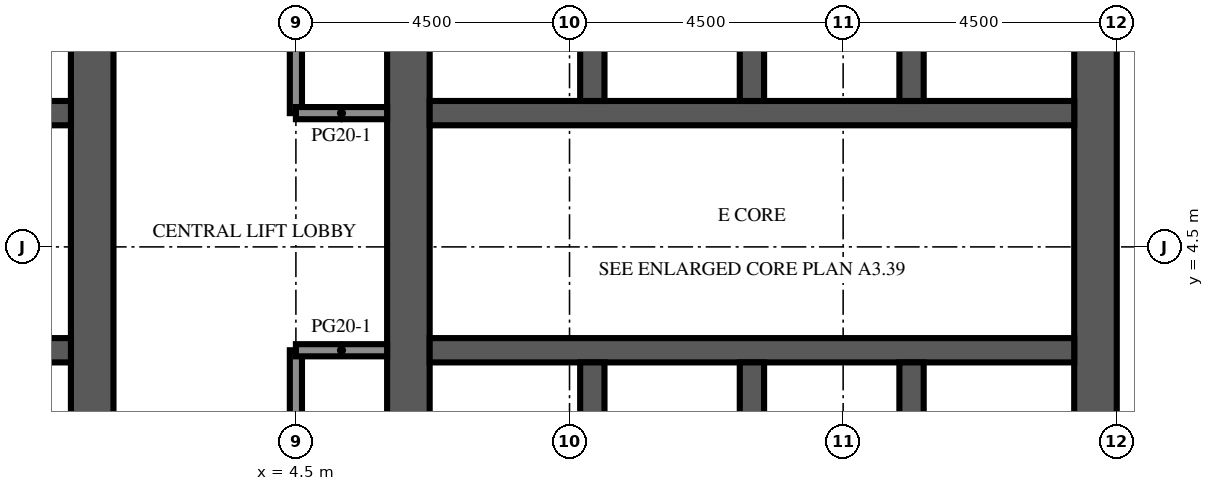
"""IFC4 building model, lengths in metres.
Left out: names, types, materials, properties, quantities, classifications, styles, units other than length and angle.
Written with IfcOpenShell. Run it as: python <this file> out.ifc"""

import sys

from ifc_helpers import new_model, si_unit, direction, frame, frame_2d, origin, place, context, subcontext, project, spatial, rectangle, extrude, element, fill, save


model = new_model("IFC4")
c1 = context("Model", 3, precision=1e-05, world=origin(), true_north=direction((0.0, 1.0)))
c2 = subcontext(c1, "Body", "Model", "MODEL_VIEW")
j1 = project(units=[si_unit("LENGTHUNIT", "METRE"), si_unit("PLANEANGLEUNIT", "RADIAN")], contexts=[c1])
p1 = place(None, origin())
s1 = spatial("IfcSite", under=j1, at=p1, CompositionType="ELEMENT")
p2 = place(p1, origin())
s2 = spatial("IfcBuilding", under=s1, at=p2, CompositionType="ELEMENT")
p3 = place(p2, frame((0.0, 0.0, 266.3)))
s3 = spatial("IfcBuildingStorey", under=s2, at=p3, CompositionType="ELEMENT", Elevation=266.3)
p4 = place(p3, frame((1.15, -9.0, 0.0), z_axis=(0.0, 0.0, 1.0), x_axis=(0.0, 1.0, 0.0)))
e1 = element("IfcWall", 1, at=p4, inside=s3, PredefinedType="SHEAR", context=c2, shape_type="SweptSolid", body=[
    extrude(rectangle(XDim=27.5, YDim=0.7, at=frame_2d((13.75, 0.0))), origin(), (0.0, 0.0, 1.0), 4.1),
])
p5 = place(p4, frame((12.55, 0.0, 0.0)))
e2 = element("IfcOpeningElement", 2, at=p5, cuts=e1, PredefinedType="OPENING", context=c2, shape_type="SweptSolid", body=[
    extrude(rectangle(XDim=2.4, YDim=2.4, at=frame_2d((1.2, 1.2))), frame((0.0, 0.36, 0.0), z_axis=(0.0, -1.0, 0.0), x_axis=(1.0, 0.0, 0.0)), (0.0, 0.0, 1.0), 0.72),
])
p6 = place(p4, frame((3.788, 0.0, 0.0)))
e3 = element("IfcOpeningElement", 3, at=p6, cuts=e1, PredefinedType="OPENING", context=c2, shape_type="SweptSolid", body=[
    extrude(rectangle(XDim=0.968, YDim=2.1, at=frame_2d((0.484, 1.05))), frame((0.0, 0.36, 0.0), z_axis=(0.0, -1.0, 0.0), x_axis=(1.0, 0.0, 0.0)), (0.0, 0.0, 1.0), 0.72),
])
p7 = place(p4, frame((23.54, 0.0, 0.0)))
e4 = element("IfcOpeningElement", 4, at=p7, cuts=e1, PredefinedType="OPENING", context=c2, shape_type="SweptSolid", body=[
    extrude(rectangle(XDim=1.2, YDim=2.1, at=frame_2d((0.6, 1.05))), frame((0.0, 0.36, 0.0), z_axis=(0.0, -1.0, 0.0), x_axis=(1.0, 0.0, 0.0)), (0.0, 0.0, 1.0), 0.72),
])
p8 = place(p3, frame((-9.8, 2.8, 0.0), z_axis=(0.0, 0.0, 1.0), x_axis=(1.0, 0.0, 0.0)))
e5 = element("IfcWall", 5, at=p8, inside=s3, PredefinedType="SHEAR", context=c2, shape_type="SweptSolid", body=[
    extrude(rectangle(XDim=10.6, YDim=0.4, at=frame_2d((5.3, 0.0))), origin(), (0.0, 0.0, 1.0), 4.1),
])
p9 = place(p8, frame((0.688, 0.0, 0.0)))
e6 = element("IfcOpeningElement", 6, at=p9, cuts=e5, PredefinedType="OPENING", context=c2, shape_type="SweptSolid", body=[
    extrude(rectangle(XDim=1.1, YDim=2.1, at=frame_2d((0.55, 1.05))), frame((0.0, 0.21, 0.0), z_axis=(0.0, -1.0, 0.0), x_axis=(1.0, 0.0, 0.0)), (0.0, 0.0, 1.0), 0.42),
])
p10 = place(p8, frame((3.438, 0.0, 0.0)))
e7 = element("IfcOpeningElement", 7, at=p10, cuts=e5, PredefinedType="OPENING", context=c2, shape_type="SweptSolid", body=[
    extrude(rectangle(XDim=1.1, YDim=2.1, at=frame_2d((0.55, 1.05))), frame((0.0, 0.21, 0.0), z_axis=(0.0, -1.0, 0.0), x_axis=(1.0, 0.0, 0.0)), (0.0, 0.0, 1.0), 0.42),
])
p11 = place(p8, frame((6.113, 0.0, 0.0)))
e8 = element("IfcOpeningElement", 8, at=p11, cuts=e5, PredefinedType="OPENING", context=c2, shape_type="SweptSolid", body=[
    extrude(rectangle(XDim=1.0, YDim=2.1, at=frame_2d((0.5, 1.05))), frame((0.0, 0.21, 0.0), z_axis=(0.0, -1.0, 0.0), x_axis=(1.0, 0.0, 0.0)), (0.0, 0.0, 1.0), 0.42),
])
p12 = place(p8, frame((8.863, 0.0, 0.0)))
e9 = element("IfcOpeningElement", 9, at=p12, cuts=e5, PredefinedType="OPENING", context=c2, shape_type="SweptSolid", body=[
    extrude(rectangle(XDim=1.0, YDim=2.1, at=frame_2d((0.5, 1.05))), frame((0.0, 0.21, 0.0), z_axis=(0.0, -1.0, 0.0), x_axis=(1.0, 0.0, 0.0)), (0.0, 0.0, 1.0), 0.42),
])
p13 = place(p3, frame((-9.8, 6.7, 0.0), z_axis=(0.0, 0.0, 1.0), x_axis=(1.0, 0.0, 0.0)))
e10 = element("IfcWall", 10, at=p13, inside=s3, PredefinedType="SHEAR", context=c2, shape_type="SweptSolid", body=[
    extrude(rectangle(XDim=10.6, YDim=0.4, at=frame_2d((5.3, 0.0))), origin(), (0.0, 0.0, 1.0), 4.1),
])
p14 = place(p13, frame((3.438, 0.0, 0.0)))
e11 = element("IfcOpeningElement", 11, at=p14, cuts=e10, PredefinedType="OPENING", context=c2, shape_type="SweptSolid", body=[
    extrude(rectangle(XDim=1.1, YDim=2.1, at=frame_2d((0.55, 1.05))), frame((0.0, 0.21, 0.0), z_axis=(0.0, -1.0, 0.0), x_axis=(1.0, 0.0, 0.0)), (0.0, 0.0, 1.0), 0.42),
])
p15 = place(p13, frame((6.062, 0.0, 0.0)))
e12 = element("IfcOpeningElement", 12, at=p15, cuts=e10, PredefinedType="OPENING", context=c2, shape_type="SweptSolid", body=[
    extrude(rectangle(XDim=1.1, YDim=2.1, at=frame_2d((0.55, 1.05))), frame((0.0, 0.21, 0.0), z_axis=(0.0, -1.0, 0.0), x_axis=(1.0, 0.0, 0.0)), (0.0, 0.0, 1.0), 0.42),
])
p16 = place(p13, frame((8.812, 0.0, 0.0)))
e13 = element("IfcOpeningElement", 13, at=p16, cuts=e10, PredefinedType="OPENING", context=c2, shape_type="SweptSolid", body=[
    extrude(rectangle(XDim=1.1, YDim=2.1, at=frame_2d((0.55, 1.05))), frame((0.0, 0.21, 0.0), z_axis=(0.0, -1.0, 0.0), x_axis=(1.0, 0.0, 0.0)), (0.0, 0.0, 1.0), 0.42),
])
p17 = place(p13, frame((0.738, 0.0, 0.0)))
e14 = element("IfcOpeningElement", 14, at=p17, cuts=e10, PredefinedType="OPENING", context=c2, shape_type="SweptSolid", body=[
    extrude(rectangle(XDim=1.0, YDim=2.1, at=frame_2d((0.5, 1.05))), frame((0.0, 0.21, 0.0), z_axis=(0.0, -1.0, 0.0), x_axis=(1.0, 0.0, 0.0)), (0.0, 0.0, 1.0), 0.42),
])
p18 = place(p3, frame((6.35, -9.0, 0.0), z_axis=(0.0, 0.0, 1.0), x_axis=(0.0, 1.0, 0.0)))
e15 = element("IfcWall", 15, at=p18, inside=s3, PredefinedType="SHEAR", context=c2, shape_type="SweptSolid", body=[
    extrude(rectangle(XDim=27.5, YDim=0.7, at=frame_2d((13.75, 0.0))), origin(), (0.0, 0.0, 1.0), 4.1),
])
p19 = place(p18, frame((12.55, 0.0, 0.0)))
e16 = element("IfcOpeningElement", 16, at=p19, cuts=e15, PredefinedType="OPENING", context=c2, shape_type="SweptSolid", body=[
    extrude(rectangle(XDim=2.4, YDim=2.4, at=frame_2d((1.2, 1.2))), frame((0.0, 0.36, 0.0), z_axis=(0.0, -1.0, 0.0), x_axis=(1.0, 0.0, 0.0)), (0.0, 0.0, 1.0), 0.72),
])
p20 = place(p18, frame((3.788, 0.0, 0.0)))
e17 = element("IfcOpeningElement", 17, at=p20, cuts=e15, PredefinedType="OPENING", context=c2, shape_type="SweptSolid", body=[
    extrude(rectangle(XDim=0.968, YDim=2.1, at=frame_2d((0.484, 1.05))), frame((0.0, 0.36, 0.0), z_axis=(0.0, -1.0, 0.0), x_axis=(1.0, 0.0, 0.0)), (0.0, 0.0, 1.0), 0.72),
])
p21 = place(p18, frame((23.54, 0.0, 0.0)))
e18 = element("IfcOpeningElement", 18, at=p21, cuts=e15, PredefinedType="OPENING", context=c2, shape_type="SweptSolid", body=[
    extrude(rectangle(XDim=1.2, YDim=2.1, at=frame_2d((0.6, 1.05))), frame((0.0, 0.36, 0.0), z_axis=(0.0, -1.0, 0.0), x_axis=(1.0, 0.0, 0.0)), (0.0, 0.0, 1.0), 0.72),
])
p22 = place(p3, frame((17.65, -9.0, 0.0), z_axis=(0.0, 0.0, 1.0), x_axis=(0.0, 1.0, 0.0)))
e19 = element("IfcWall", 19, at=p22, inside=s3, PredefinedType="SHEAR", context=c2, shape_type="SweptSolid", body=[
    extrude(rectangle(XDim=27.5, YDim=0.7, at=frame_2d((13.75, 0.0))), origin(), (0.0, 0.0, 1.0), 4.1),
])
p23 = place(p22, frame((12.55, 0.0, 0.0)))
e20 = element("IfcOpeningElement", 20, at=p23, cuts=e19, PredefinedType="OPENING", context=c2, shape_type="SweptSolid", body=[
    extrude(rectangle(XDim=2.4, YDim=2.4, at=frame_2d((1.2, 1.2))), frame((0.0, 0.36, 0.0), z_axis=(0.0, -1.0, 0.0), x_axis=(1.0, 0.0, 0.0)), (0.0, 0.0, 1.0), 0.72),
])
p24 = place(p22, frame((6.825, 0.0, 0.0)))
e21 = element("IfcOpeningElement", 21, at=p24, cuts=e19, PredefinedType="OPENING", context=c2, shape_type="SweptSolid", body=[
    extrude(rectangle(XDim=1.2, YDim=2.1, at=frame_2d((0.6, 1.05))), frame((0.0, 0.36, 0.0), z_axis=(0.0, -1.0, 0.0), x_axis=(1.0, 0.0, 0.0)), (0.0, 0.0, 1.0), 0.72),
])
p25 = place(p22, frame((19.475, 0.0, 0.0)))
e22 = element("IfcOpeningElement", 22, at=p25, cuts=e19, PredefinedType="OPENING", context=c2, shape_type="SweptSolid", body=[
    extrude(rectangle(XDim=1.2, YDim=2.1, at=frame_2d((0.6, 1.05))), frame((0.0, 0.36, 0.0), z_axis=(0.0, -1.0, 0.0), x_axis=(1.0, 0.0, 0.0)), (0.0, 0.0, 1.0), 0.72),
])
p26 = place(p3, frame((6.7, 2.8, 0.0), z_axis=(0.0, 0.0, 1.0), x_axis=(1.0, 0.0, 0.0)))
e23 = element("IfcWall", 23, at=p26, inside=s3, PredefinedType="SHEAR", context=c2, shape_type="SweptSolid", body=[
    extrude(rectangle(XDim=10.6, YDim=0.4, at=frame_2d((5.3, 0.0))), origin(), (0.0, 0.0, 1.0), 4.1),
])
p27 = place(p26, frame((0.688, 0.0, 0.0)))
e24 = element("IfcOpeningElement", 24, at=p27, cuts=e23, PredefinedType="OPENING", context=c2, shape_type="SweptSolid", body=[
    extrude(rectangle(XDim=1.1, YDim=2.1, at=frame_2d((0.55, 1.05))), frame((0.0, 0.21, 0.0), z_axis=(0.0, -1.0, 0.0), x_axis=(1.0, 0.0, 0.0)), (0.0, 0.0, 1.0), 0.42),
])
p28 = place(p26, frame((3.438, 0.0, 0.0)))
e25 = element("IfcOpeningElement", 25, at=p28, cuts=e23, PredefinedType="OPENING", context=c2, shape_type="SweptSolid", body=[
    extrude(rectangle(XDim=1.1, YDim=2.1, at=frame_2d((0.55, 1.05))), frame((0.0, 0.21, 0.0), z_axis=(0.0, -1.0, 0.0), x_axis=(1.0, 0.0, 0.0)), (0.0, 0.0, 1.0), 0.42),
])
p29 = place(p26, frame((6.113, 0.0, 0.0)))
e26 = element("IfcOpeningElement", 26, at=p29, cuts=e23, PredefinedType="OPENING", context=c2, shape_type="SweptSolid", body=[
    extrude(rectangle(XDim=1.0, YDim=2.1, at=frame_2d((0.5, 1.05))), frame((0.0, 0.21, 0.0), z_axis=(0.0, -1.0, 0.0), x_axis=(1.0, 0.0, 0.0)), (0.0, 0.0, 1.0), 0.42),
])
p30 = place(p26, frame((8.863, 0.0, 0.0)))
e27 = element("IfcOpeningElement", 27, at=p30, cuts=e23, PredefinedType="OPENING", context=c2, shape_type="SweptSolid", body=[
    extrude(rectangle(XDim=1.0, YDim=2.1, at=frame_2d((0.5, 1.05))), frame((0.0, 0.21, 0.0), z_axis=(0.0, -1.0, 0.0), x_axis=(1.0, 0.0, 0.0)), (0.0, 0.0, 1.0), 0.42),
])
p31 = place(p3, frame((6.7, 6.7, 0.0), z_axis=(0.0, 0.0, 1.0), x_axis=(1.0, 0.0, 0.0)))
e28 = element("IfcWall", 28, at=p31, inside=s3, PredefinedType="SHEAR", context=c2, shape_type="SweptSolid", body=[
    extrude(rectangle(XDim=10.6, YDim=0.4, at=frame_2d((5.3, 0.0))), origin(), (0.0, 0.0, 1.0), 4.1),
])
p32 = place(p31, frame((3.438, 0.0, 0.0)))
e29 = element("IfcOpeningElement", 29, at=p32, cuts=e28, PredefinedType="OPENING", context=c2, shape_type="SweptSolid", body=[
    extrude(rectangle(XDim=1.1, YDim=2.1, at=frame_2d((0.55, 1.05))), frame((0.0, 0.21, 0.0), z_axis=(0.0, -1.0, 0.0), x_axis=(1.0, 0.0, 0.0)), (0.0, 0.0, 1.0), 0.42),
])
p33 = place(p31, frame((6.062, 0.0, 0.0)))
e30 = element("IfcOpeningElement", 30, at=p33, cuts=e28, PredefinedType="OPENING", context=c2, shape_type="SweptSolid", body=[
    extrude(rectangle(XDim=1.1, YDim=2.1, at=frame_2d((0.55, 1.05))), frame((0.0, 0.21, 0.0), z_axis=(0.0, -1.0, 0.0), x_axis=(1.0, 0.0, 0.0)), (0.0, 0.0, 1.0), 0.42),
])
p34 = place(p31, frame((8.812, 0.0, 0.0)))
e31 = element("IfcOpeningElement", 31, at=p34, cuts=e28, PredefinedType="OPENING", context=c2, shape_type="SweptSolid", body=[
    extrude(rectangle(XDim=1.1, YDim=2.1, at=frame_2d((0.55, 1.05))), frame((0.0, 0.21, 0.0), z_axis=(0.0, -1.0, 0.0), x_axis=(1.0, 0.0, 0.0)), (0.0, 0.0, 1.0), 0.42),
])
p35 = place(p31, frame((0.738, 0.0, 0.0)))
e32 = element("IfcOpeningElement", 32, at=p35, cuts=e28, PredefinedType="OPENING", context=c2, shape_type="SweptSolid", body=[
    extrude(rectangle(XDim=1.0, YDim=2.1, at=frame_2d((0.5, 1.05))), frame((0.0, 0.21, 0.0), z_axis=(0.0, -1.0, 0.0), x_axis=(1.0, 0.0, 0.0)), (0.0, 0.0, 1.0), 0.42),
])
for number, where, z_axis, x_axis in (
    (33, (9.375, -0.3, 0.0), (0.0, 0.0, 1.0), (0.0, 1.0, 0.0)),
    (34, (9.375, 6.9, 0.0), (0.0, 0.0, 1.0), (0.0, 1.0, 0.0)),
    (35, (12.0, -0.3, 0.0), (0.0, 0.0, 1.0), (0.0, 1.0, 0.0)),
    (36, (12.0, 6.9, 0.0), (0.0, 0.0, 1.0), (0.0, 1.0, 0.0)),
    (37, (14.625, -0.3, 0.0), (0.0, 0.0, 1.0), (0.0, 1.0, 0.0)),
    (38, (14.625, 6.9, 0.0), (0.0, 0.0, 1.0), (0.0, 1.0, 0.0)),
):
    element("IfcWall", number, at=place(p3, frame(where, z_axis=z_axis, x_axis=x_axis)), inside=s3, PredefinedType="SHEAR", context=c2, shape_type="SweptSolid", body=[
        extrude(rectangle(XDim=2.9, YDim=0.4, at=frame_2d((1.45, 0.0))), origin(), (0.0, 0.0, 1.0), 4.1),
    ])
p36 = place(p3, frame((4.5, 2.8, 0.0), z_axis=(0.0, 0.0, 1.0), x_axis=(0.0, -1.0, 0.0)))
e39 = element("IfcWall", 39, at=p36, inside=s3, PredefinedType="PARTITIONING", context=c2, shape_type="SweptSolid", body=[
    extrude(rectangle(XDim=6.3, YDim=0.2, at=frame_2d((3.15, 0.0))), origin(), (0.0, 0.0, 1.0), 3.65),
])
p37 = place(p36, frame((2.45, 0.0, 0.0)))
e40 = element("IfcOpeningElement", 40, at=p37, cuts=e39, PredefinedType="OPENING", context=c2, shape_type="SweptSolid", body=[
    extrude(rectangle(XDim=1.0, YDim=2.1, at=frame_2d((0.5, 1.05))), frame((0.0, 0.11, 0.0), z_axis=(0.0, -1.0, 0.0), x_axis=(1.0, 0.0, 0.0)), (0.0, 0.0, 1.0), 0.22),
])
p38 = place(p3, frame((4.5, 18.5, 0.0), z_axis=(0.0, 0.0, 1.0), x_axis=(0.0, -1.0, 0.0)))
e41 = element("IfcWall", 41, at=p38, inside=s3, PredefinedType="PARTITIONING", context=c2, shape_type="SweptSolid", body=[
    extrude(rectangle(XDim=11.8, YDim=0.2, at=frame_2d((5.9, 0.0))), origin(), (0.0, 0.0, 1.0), 3.65),
])
p39 = place(p38, frame((4.95, 0.0, 0.0)))
e42 = element("IfcOpeningElement", 42, at=p39, cuts=e41, PredefinedType="OPENING", context=c2, shape_type="SweptSolid", body=[
    extrude(rectangle(XDim=1.0, YDim=2.1, at=frame_2d((0.5, 1.05))), frame((0.0, 0.11, 0.0), z_axis=(0.0, -1.0, 0.0), x_axis=(1.0, 0.0, 0.0)), (0.0, 0.0, 1.0), 0.22),
])
for number, where, z_axis, x_axis in (
    (43, (4.5, 2.8, 0.0), (0.0, 0.0, 1.0), (1.0, 0.0, 0.0)),
    (44, (4.5, 6.7, 0.0), (0.0, 0.0, 1.0), (1.0, 0.0, 0.0)),
):
    element("IfcWall", number, at=place(p3, frame(where, z_axis=z_axis, x_axis=x_axis)), inside=s3, PredefinedType="PARTITIONING", context=c2, shape_type="SweptSolid", body=[
        extrude(rectangle(XDim=1.5, YDim=0.2, at=frame_2d((0.75, 0.0))), origin(), (0.0, 0.0, 1.0), 3.65),
    ])
p40 = place(p27, origin())
e45 = element("IfcDoor", 45, at=p40, inside=s3, OperationType="DOUBLE_DOOR_SLIDING", PredefinedType="DOOR", context=c2, shape_type="SweptSolid", body=[
    extrude(rectangle(XDim=1.1, YDim=2.1, at=frame_2d((0.55, 1.05))), frame((0.0, 0.025, 0.0), z_axis=(0.0, -1.0, 0.0), x_axis=(1.0, 0.0, 0.0)), (0.0, 0.0, 1.0), 0.05),
])
fill(e24, e45)
p41 = place(p28, origin())
e46 = element("IfcDoor", 46, at=p41, inside=s3, OperationType="DOUBLE_DOOR_SLIDING", PredefinedType="DOOR", context=c2, shape_type="SweptSolid", body=[
    extrude(rectangle(XDim=1.1, YDim=2.1, at=frame_2d((0.55, 1.05))), frame((0.0, 0.025, 0.0), z_axis=(0.0, -1.0, 0.0), x_axis=(1.0, 0.0, 0.0)), (0.0, 0.0, 1.0), 0.05),
])
fill(e25, e46)
p42 = place(p32, origin())
e47 = element("IfcDoor", 47, at=p42, inside=s3, OperationType="DOUBLE_DOOR_SLIDING", PredefinedType="DOOR", context=c2, shape_type="SweptSolid", body=[
    extrude(rectangle(XDim=1.1, YDim=2.1, at=frame_2d((0.55, 1.05))), frame((0.0, 0.025, 0.0), z_axis=(0.0, -1.0, 0.0), x_axis=(1.0, 0.0, 0.0)), (0.0, 0.0, 1.0), 0.05),
])
fill(e29, e47)
p43 = place(p33, origin())
e48 = element("IfcDoor", 48, at=p43, inside=s3, OperationType="DOUBLE_DOOR_SLIDING", PredefinedType="DOOR", context=c2, shape_type="SweptSolid", body=[
    extrude(rectangle(XDim=1.1, YDim=2.1, at=frame_2d((0.55, 1.05))), frame((0.0, 0.025, 0.0), z_axis=(0.0, -1.0, 0.0), x_axis=(1.0, 0.0, 0.0)), (0.0, 0.0, 1.0), 0.05),
])
fill(e30, e48)
p44 = place(p34, origin())
e49 = element("IfcDoor", 49, at=p44, inside=s3, OperationType="DOUBLE_DOOR_SLIDING", PredefinedType="DOOR", context=c2, shape_type="SweptSolid", body=[
    extrude(rectangle(XDim=1.1, YDim=2.1, at=frame_2d((0.55, 1.05))), frame((0.0, 0.025, 0.0), z_axis=(0.0, -1.0, 0.0), x_axis=(1.0, 0.0, 0.0)), (0.0, 0.0, 1.0), 0.05),
])
fill(e31, e49)
p45 = place(p5, origin())
e50 = element("IfcDoor", 50, at=p45, inside=s3, OperationType="DOUBLE_DOOR_DOUBLE_SWING", PredefinedType="DOOR", context=c2, shape_type="SweptSolid", body=[
    extrude(rectangle(XDim=2.4, YDim=2.4, at=frame_2d((1.2, 1.2))), frame((0.0, 0.025, 0.0), z_axis=(0.0, -1.0, 0.0), x_axis=(1.0, 0.0, 0.0)), (0.0, 0.0, 1.0), 0.05),
])
fill(e2, e50)
p46 = place(p19, origin())
e51 = element("IfcDoor", 51, at=p46, inside=s3, OperationType="DOUBLE_DOOR_DOUBLE_SWING", PredefinedType="DOOR", context=c2, shape_type="SweptSolid", body=[
    extrude(rectangle(XDim=2.4, YDim=2.4, at=frame_2d((1.2, 1.2))), frame((0.0, 0.025, 0.0), z_axis=(0.0, -1.0, 0.0), x_axis=(1.0, 0.0, 0.0)), (0.0, 0.0, 1.0), 0.05),
])
fill(e16, e51)
p47 = place(p23, origin())
e52 = element("IfcDoor", 52, at=p47, inside=s3, OperationType="DOUBLE_DOOR_DOUBLE_SWING", PredefinedType="DOOR", context=c2, shape_type="SweptSolid", body=[
    extrude(rectangle(XDim=2.4, YDim=2.4, at=frame_2d((1.2, 1.2))), frame((0.0, 0.025, 0.0), z_axis=(0.0, -1.0, 0.0), x_axis=(1.0, 0.0, 0.0)), (0.0, 0.0, 1.0), 0.05),
])
fill(e20, e52)
p48 = place(p29, origin())
e53 = element("IfcDoor", 53, at=p48, inside=s3, OperationType="SINGLE_SWING_LEFT", PredefinedType="DOOR", context=c2, shape_type="SweptSolid", body=[
    extrude(rectangle(XDim=1.0, YDim=2.1, at=frame_2d((0.5, 1.05))), frame((0.0, 0.025, 0.0), z_axis=(0.0, -1.0, 0.0), x_axis=(1.0, 0.0, 0.0)), (0.0, 0.0, 1.0), 0.05),
])
fill(e26, e53)
p49 = place(p30, origin())
e54 = element("IfcDoor", 54, at=p49, inside=s3, OperationType="SINGLE_SWING_RIGHT", PredefinedType="DOOR", context=c2, shape_type="SweptSolid", body=[
    extrude(rectangle(XDim=1.0, YDim=2.1, at=frame_2d((0.5, 1.05))), frame((0.0, 0.025, 0.0), z_axis=(0.0, -1.0, 0.0), x_axis=(1.0, 0.0, 0.0)), (0.0, 0.0, 1.0), 0.05),
])
fill(e27, e54)
p50 = place(p35, origin())
e55 = element("IfcDoor", 55, at=p50, inside=s3, OperationType="SINGLE_SWING_LEFT", PredefinedType="DOOR", context=c2, shape_type="SweptSolid", body=[
    extrude(rectangle(XDim=1.0, YDim=2.1, at=frame_2d((0.5, 1.05))), frame((0.0, 0.025, 0.0), z_axis=(0.0, -1.0, 0.0), x_axis=(1.0, 0.0, 0.0)), (0.0, 0.0, 1.0), 0.05),
])
fill(e32, e55)
save(model, sys.argv[1])
